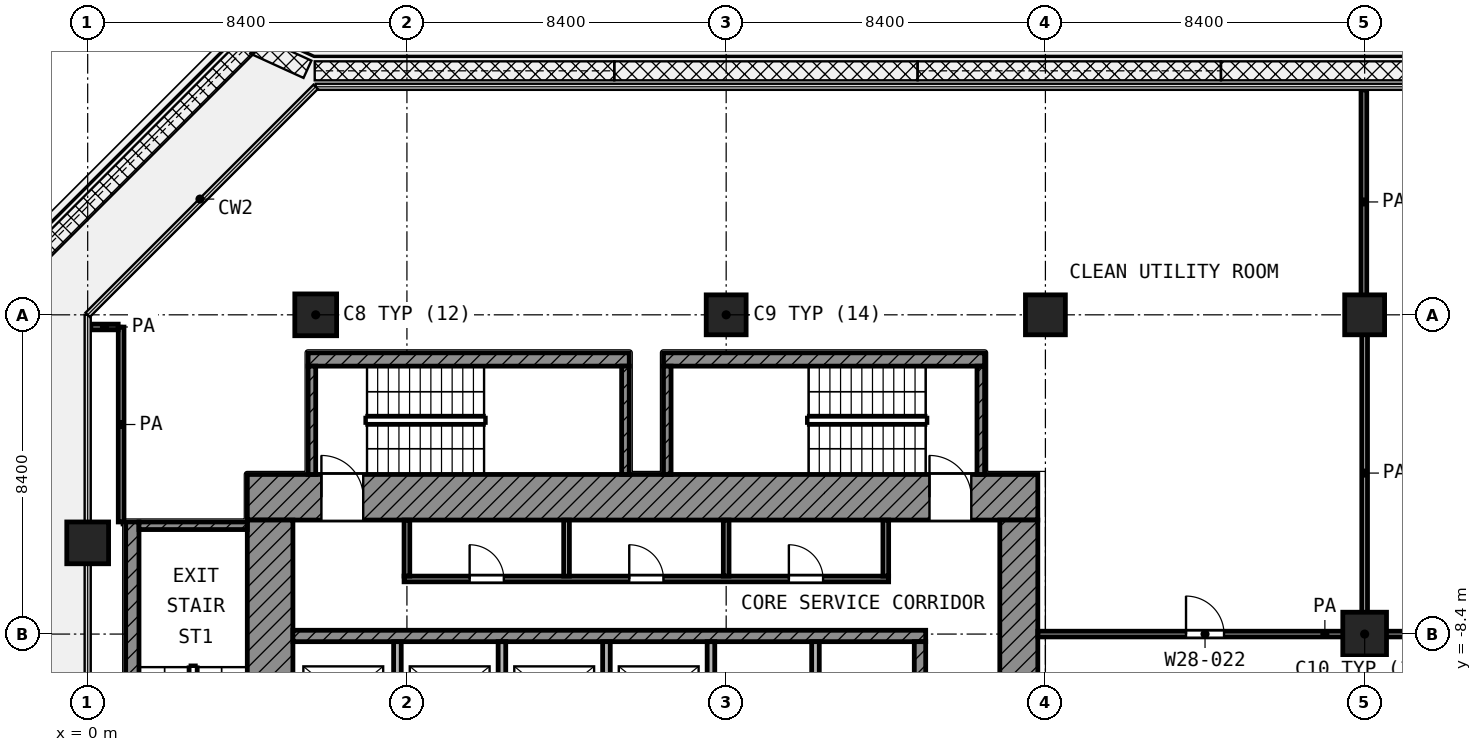
"""IFC4 building model, lengths in metres.
Left out: names, types, materials, properties, quantities, classifications, styles, units other than length and angle.
Written with IfcOpenShell. Run it as: python <this file> out.ifc"""

import sys

from ifc_helpers import new_model, si_unit, direction, frame, frame_2d, origin, origin_2d, place, context, subcontext, project, spatial, rectangle, extrude, element, fill, save


model = new_model("IFC4")
c1 = context("Model", 3, precision=1e-05, world=origin(), true_north=direction((0.0, 1.0)))
c2 = subcontext(c1, "Body", "Model", "MODEL_VIEW")
j1 = project(units=[si_unit("LENGTHUNIT", "METRE"), si_unit("PLANEANGLEUNIT", "RADIAN")], contexts=[c1])
p1 = place(None, origin())
s1 = spatial("IfcSite", under=j1, at=p1, CompositionType="ELEMENT")
p2 = place(p1, origin())
s2 = spatial("IfcBuilding", under=s1, at=p2, CompositionType="ELEMENT")
p3 = place(p2, frame((0.0, 0.0, 145.0)))
s3 = spatial("IfcBuildingStorey", under=s2, at=p3, CompositionType="ELEMENT", Elevation=145.0)
p4 = place(p3, frame((6.0, 0.0, 0.0), z_axis=(0.0, 0.0, 1.0), x_axis=(1.0, 0.0, 0.0)))
e1 = element("IfcColumn", 1, at=p4, inside=s3, PredefinedType="COLUMN", context=c2, shape_type="SweptSolid", body=[
    extrude(rectangle(XDim=1.1, YDim=1.1, at=origin_2d()), origin(), (0.0, 0.0, 1.0), 4.2),
])
for number, where, z_axis, x_axis in (
    (2, (16.8, 0.0, 0.0), (0.0, 0.0, 1.0), (1.0, 0.0, 0.0)),
    (3, (25.2, 0.0, 0.0), (0.0, 0.0, 1.0), (1.0, 0.0, 0.0)),
    (4, (33.6, 0.0, 0.0), (0.0, 0.0, 1.0), (1.0, 0.0, 0.0)),
):
    element("IfcColumn", number, at=place(p3, frame(where, z_axis=z_axis, x_axis=x_axis)), inside=s3, PredefinedType="COLUMN", context=c2, shape_type="SweptSolid", body=[
        extrude(rectangle(XDim=1.05, YDim=1.05, at=origin_2d()), origin(), (0.0, 0.0, 1.0), 4.2),
    ])
p5 = place(p3, frame((0.0, -6.0, 0.0), z_axis=(0.0, 0.0, 1.0), x_axis=(1.0, 0.0, 0.0)))
e5 = element("IfcColumn", 5, at=p5, inside=s3, PredefinedType="COLUMN", context=c2, shape_type="SweptSolid", body=[
    extrude(rectangle(XDim=1.1, YDim=1.1, at=origin_2d()), origin(), (0.0, 0.0, 1.0), 4.2),
])
p6 = place(p3, frame((33.6, -8.4, 0.0), z_axis=(0.0, 0.0, 1.0), x_axis=(1.0, 0.0, 0.0)))
e6 = element("IfcColumn", 6, at=p6, inside=s3, PredefinedType="COLUMN", context=c2, shape_type="SweptSolid", body=[
    extrude(rectangle(XDim=1.15, YDim=1.15, at=origin_2d()), origin(), (0.0, 0.0, 1.0), 4.2),
])
p7 = place(p3, frame((4.2, -4.8, 0.0), z_axis=(0.0, 0.0, 1.0), x_axis=(1.0, 0.0, 0.0)))
e7 = element("IfcWall", 7, at=p7, inside=s3, PredefinedType="SHEAR", context=c2, shape_type="SweptSolid", body=[
    extrude(rectangle(XDim=20.8, YDim=1.2, at=frame_2d((10.4, 0.0))), origin(), (0.0, 0.0, 1.0), 3.6),
])
p8 = place(p7, frame((1.95, 0.0, 0.0)))
e8 = element("IfcOpeningElement", 8, at=p8, cuts=e7, PredefinedType="OPENING", context=c2, shape_type="SweptSolid", body=[
    extrude(rectangle(XDim=1.1, YDim=2.1, at=frame_2d((0.55, 1.05))), frame((0.0, 0.61, 0.0), z_axis=(0.0, -1.0, 0.0), x_axis=(1.0, 0.0, 0.0)), (0.0, 0.0, 1.0), 1.22),
])
p9 = place(p7, frame((17.95, 0.0, 0.0)))
e9 = element("IfcOpeningElement", 9, at=p9, cuts=e7, PredefinedType="OPENING", context=c2, shape_type="SweptSolid", body=[
    extrude(rectangle(XDim=1.1, YDim=2.1, at=frame_2d((0.55, 1.05))), frame((0.0, 0.61, 0.0), z_axis=(0.0, -1.0, 0.0), x_axis=(1.0, 0.0, 0.0)), (0.0, 0.0, 1.0), 1.22),
])
p10 = place(p3, frame((4.8, -25.0, 0.0), z_axis=(0.0, 0.0, 1.0), x_axis=(0.0, 1.0, 0.0)))
e10 = element("IfcWall", 10, at=p10, inside=s3, PredefinedType="SHEAR", context=c2, shape_type="SweptSolid", body=[
    extrude(rectangle(XDim=19.6, YDim=1.2, at=frame_2d((9.8, 0.0))), origin(), (0.0, 0.0, 1.0), 3.6),
])
p11 = place(p10, frame((11.45, 0.0, 0.0)))
e11 = element("IfcOpeningElement", 11, at=p11, cuts=e10, PredefinedType="OPENING", context=c2, shape_type="SweptSolid", body=[
    extrude(rectangle(XDim=1.1, YDim=2.1, at=frame_2d((0.55, 1.05))), frame((0.0, 0.61, 0.0), z_axis=(0.0, -1.0, 0.0), x_axis=(1.0, 0.0, 0.0)), (0.0, 0.0, 1.0), 1.22),
])
p12 = place(p10, frame((2.15, 0.0, 0.0)))
e12 = element("IfcOpeningElement", 12, at=p12, cuts=e10, PredefinedType="OPENING", context=c2, shape_type="SweptSolid", body=[
    extrude(rectangle(XDim=1.1, YDim=2.1, at=frame_2d((0.55, 1.05))), frame((0.0, 0.61, 0.0), z_axis=(0.0, -1.0, 0.0), x_axis=(1.0, 0.0, 0.0)), (0.0, 0.0, 1.0), 1.22),
])
p13 = place(p3, frame((24.5, -24.0, 0.0), z_axis=(0.0, 0.0, 1.0), x_axis=(0.0, 1.0, 0.0)))
e13 = element("IfcWall", 13, at=p13, inside=s3, PredefinedType="SHEAR", context=c2, shape_type="SweptSolid", body=[
    extrude(rectangle(XDim=18.6, YDim=1.0, at=frame_2d((9.3, 0.0))), origin(), (0.0, 0.0, 1.0), 3.6),
])
p14 = place(p13, frame((10.5, 0.0, 0.0)))
e14 = element("IfcOpeningElement", 14, at=p14, cuts=e13, PredefinedType="OPENING", context=c2, shape_type="SweptSolid", body=[
    extrude(rectangle(XDim=1.8, YDim=2.1, at=frame_2d((0.9, 1.05))), frame((0.0, 0.51, 0.0), z_axis=(0.0, -1.0, 0.0), x_axis=(1.0, 0.0, 0.0)), (0.0, 0.0, 1.0), 1.02),
])
p15 = place(p3, frame((5.4, -8.45, 0.0), z_axis=(0.0, 0.0, 1.0), x_axis=(1.0, 0.0, 0.0)))
e15 = element("IfcWall", 15, at=p15, inside=s3, PredefinedType="SHEAR", context=c2, shape_type="SweptSolid", body=[
    extrude(rectangle(XDim=16.65, YDim=0.3, at=frame_2d((8.325, 0.0))), origin(), (0.0, 0.0, 1.0), 3.6),
])
p16 = place(p3, frame((21.9, -10.95, 0.0), z_axis=(0.0, 0.0, 1.0), x_axis=(0.0, 1.0, 0.0)))
e16 = element("IfcWall", 16, at=p16, inside=s3, PredefinedType="SHEAR", context=c2, shape_type="SweptSolid", body=[
    extrude(rectangle(XDim=2.35, YDim=0.3, at=frame_2d((1.175, 0.0))), origin(), (0.0, 0.0, 1.0), 3.6),
])
for number, where, z_axis, x_axis in (
    (17, (8.15, -10.95, 0.0), (0.0, 0.0, 1.0), (0.0, 1.0, 0.0)),
    (18, (10.9, -10.95, 0.0), (0.0, 0.0, 1.0), (0.0, 1.0, 0.0)),
    (19, (13.65, -10.95, 0.0), (0.0, 0.0, 1.0), (0.0, 1.0, 0.0)),
    (20, (16.4, -10.95, 0.0), (0.0, 0.0, 1.0), (0.0, 1.0, 0.0)),
    (21, (19.15, -10.95, 0.0), (0.0, 0.0, 1.0), (0.0, 1.0, 0.0)),
):
    element("IfcWall", number, at=place(p3, frame(where, z_axis=z_axis, x_axis=x_axis)), inside=s3, PredefinedType="PARTITIONING", context=c2, shape_type="SweptSolid", body=[
        extrude(rectangle(XDim=2.35, YDim=0.2, at=frame_2d((1.175, 0.0))), origin(), (0.0, 0.0, 1.0), 3.6),
    ])
p17 = place(p3, frame((8.325, -6.95, 0.0), z_axis=(0.0, 0.0, 1.0), x_axis=(1.0, 0.0, 0.0)))
e22 = element("IfcWall", 22, at=p17, inside=s3, PredefinedType="PARTITIONING", context=c2, shape_type="SweptSolid", body=[
    extrude(rectangle(XDim=12.75, YDim=0.15, at=frame_2d((6.375, 0.0))), origin(), (0.0, 0.0, 1.0), 3.6),
])
p18 = place(p17, frame((1.725, 0.0, 0.0)))
e23 = element("IfcOpeningElement", 23, at=p18, cuts=e22, PredefinedType="OPENING", context=c2, shape_type="SweptSolid", body=[
    extrude(rectangle(XDim=0.9, YDim=2.1, at=frame_2d((0.45, 1.05))), frame((0.0, 0.085, 0.0), z_axis=(0.0, -1.0, 0.0), x_axis=(1.0, 0.0, 0.0)), (0.0, 0.0, 1.0), 0.17),
])
p19 = place(p17, frame((5.925, 0.0, 0.0)))
e24 = element("IfcOpeningElement", 24, at=p19, cuts=e22, PredefinedType="OPENING", context=c2, shape_type="SweptSolid", body=[
    extrude(rectangle(XDim=0.9, YDim=2.1, at=frame_2d((0.45, 1.05))), frame((0.0, 0.085, 0.0), z_axis=(0.0, -1.0, 0.0), x_axis=(1.0, 0.0, 0.0)), (0.0, 0.0, 1.0), 0.17),
])
p20 = place(p17, frame((10.125, 0.0, 0.0)))
e25 = element("IfcOpeningElement", 25, at=p20, cuts=e22, PredefinedType="OPENING", context=c2, shape_type="SweptSolid", body=[
    extrude(rectangle(XDim=0.9, YDim=2.1, at=frame_2d((0.45, 1.05))), frame((0.0, 0.085, 0.0), z_axis=(0.0, -1.0, 0.0), x_axis=(1.0, 0.0, 0.0)), (0.0, 0.0, 1.0), 0.17),
])
for number, where, z_axis, x_axis in (
    (26, (8.4, -6.875, 0.0), (0.0, 0.0, 1.0), (0.0, 1.0, 0.0)),
    (27, (12.6, -6.875, 0.0), (0.0, 0.0, 1.0), (0.0, 1.0, 0.0)),
    (28, (16.8, -6.875, 0.0), (0.0, 0.0, 1.0), (0.0, 1.0, 0.0)),
    (29, (21.0, -6.875, 0.0), (0.0, 0.0, 1.0), (0.0, 1.0, 0.0)),
):
    element("IfcWall", number, at=place(p3, frame(where, z_axis=z_axis, x_axis=x_axis)), inside=s3, PredefinedType="PARTITIONING", context=c2, shape_type="SweptSolid", body=[
        extrude(rectangle(XDim=1.475, YDim=0.15, at=frame_2d((0.738, 0.0))), origin(), (0.0, 0.0, 1.0), 3.6),
    ])
p21 = place(p3, frame((1.175, -13.9, 0.0), z_axis=(0.0, 0.0, 1.0), x_axis=(0.0, 1.0, 0.0)))
e30 = element("IfcWall", 30, at=p21, inside=s3, PredefinedType="SHEAR", context=c2, shape_type="SweptSolid", body=[
    extrude(rectangle(XDim=8.45, YDim=0.35, at=frame_2d((4.225, 0.0))), origin(), (0.0, 0.0, 1.0), 3.6),
])
p22 = place(p3, frame((1.35, -5.55, 0.0), z_axis=(0.0, 0.0, 1.0), x_axis=(1.0, 0.0, 0.0)))
e31 = element("IfcWall", 31, at=p22, inside=s3, PredefinedType="SHEAR", context=c2, shape_type="SweptSolid", body=[
    extrude(rectangle(XDim=2.85, YDim=0.2, at=frame_2d((1.425, 0.0))), origin(), (0.0, 0.0, 1.0), 3.6),
])
p23 = place(p3, frame((5.8, -1.175, 0.0), z_axis=(0.0, 0.0, 1.0), x_axis=(1.0, 0.0, 0.0)))
e32 = element("IfcWall", 32, at=p23, inside=s3, PredefinedType="SHEAR", context=c2, shape_type="SweptSolid", body=[
    extrude(rectangle(XDim=8.45, YDim=0.35, at=frame_2d((4.225, 0.0))), origin(), (0.0, 0.0, 1.0), 3.6),
])
for number, where, z_axis, x_axis in (
    (33, (5.9, -4.2, 0.0), (0.0, 0.0, 1.0), (0.0, 1.0, 0.0)),
    (34, (14.15, -4.2, 0.0), (0.0, 0.0, 1.0), (0.0, 1.0, 0.0)),
):
    element("IfcWall", number, at=place(p3, frame(where, z_axis=z_axis, x_axis=x_axis)), inside=s3, PredefinedType="SHEAR", context=c2, shape_type="SweptSolid", body=[
        extrude(rectangle(XDim=2.85, YDim=0.2, at=frame_2d((1.425, 0.0))), origin(), (0.0, 0.0, 1.0), 3.6),
    ])
p24 = place(p3, frame((15.15, -1.175, 0.0), z_axis=(0.0, 0.0, 1.0), x_axis=(1.0, 0.0, 0.0)))
e35 = element("IfcWall", 35, at=p24, inside=s3, PredefinedType="SHEAR", context=c2, shape_type="SweptSolid", body=[
    extrude(rectangle(XDim=8.45, YDim=0.35, at=frame_2d((4.225, 0.0))), origin(), (0.0, 0.0, 1.0), 3.6),
])
for number, where, z_axis, x_axis in (
    (36, (15.25, -4.2, 0.0), (0.0, 0.0, 1.0), (0.0, 1.0, 0.0)),
    (37, (23.5, -4.2, 0.0), (0.0, 0.0, 1.0), (0.0, 1.0, 0.0)),
):
    element("IfcWall", number, at=place(p3, frame(where, z_axis=z_axis, x_axis=x_axis)), inside=s3, PredefinedType="SHEAR", context=c2, shape_type="SweptSolid", body=[
        extrude(rectangle(XDim=2.85, YDim=0.2, at=frame_2d((1.425, 0.0))), origin(), (0.0, 0.0, 1.0), 3.6),
    ])
p25 = place(p3, frame((25.0, -8.4, 0.0), z_axis=(0.0, 0.0, 1.0), x_axis=(1.0, 0.0, 0.0)))
e38 = element("IfcWall", 38, at=p25, inside=s3, PredefinedType="PARTITIONING", context=c2, shape_type="SweptSolid", body=[
    extrude(rectangle(XDim=15.107, YDim=0.15, at=frame_2d((7.553, 0.0))), origin(), (0.0, 0.0, 1.0), 3.6),
])
p26 = place(p25, frame((3.9, 0.0, 0.0)))
e39 = element("IfcOpeningElement", 39, at=p26, cuts=e38, PredefinedType="OPENING", context=c2, shape_type="SweptSolid", body=[
    extrude(rectangle(XDim=1.0, YDim=2.1, at=frame_2d((0.5, 1.05))), frame((0.0, 0.085, 0.0), z_axis=(0.0, -1.0, 0.0), x_axis=(1.0, 0.0, 0.0)), (0.0, 0.0, 1.0), 0.17),
])
p27 = place(p25, frame((10.1, 0.0, 0.0)))
e40 = element("IfcOpeningElement", 40, at=p27, cuts=e38, PredefinedType="OPENING", context=c2, shape_type="SweptSolid", body=[
    extrude(rectangle(XDim=1.2, YDim=2.1, at=frame_2d((0.6, 1.05))), frame((0.0, 0.085, 0.0), z_axis=(0.0, -1.0, 0.0), x_axis=(1.0, 0.0, 0.0)), (0.0, 0.0, 1.0), 0.17),
])
p28 = place(p3, frame((0.08, -0.32, 0.0), z_axis=(0.0, 0.0, 1.0), x_axis=(1.0, 0.0, 0.0)))
e41 = element("IfcWall", 41, at=p28, inside=s3, PredefinedType="PARTITIONING", context=c2, shape_type="SweptSolid", body=[
    extrude(rectangle(XDim=0.723, YDim=0.15, at=frame_2d((0.361, 0.0))), origin(), (0.0, 0.0, 1.0), 3.6),
])
p29 = place(p3, frame((0.88, -5.45, 0.0), z_axis=(0.0, 0.0, 1.0), x_axis=(0.0, 1.0, 0.0)))
e42 = element("IfcWall", 42, at=p29, inside=s3, PredefinedType="PARTITIONING", context=c2, shape_type="SweptSolid", body=[
    extrude(rectangle(XDim=5.128, YDim=0.15, at=frame_2d((2.564, 0.0))), origin(), (0.0, 0.0, 1.0), 3.6),
])
p30 = place(p3, frame((33.58, 0.02, 0.0), z_axis=(0.0, 0.0, 1.0), x_axis=(0.0, 1.0, 0.0)))
e43 = element("IfcWall", 43, at=p30, inside=s3, PredefinedType="PARTITIONING", context=c2, shape_type="SweptSolid", body=[
    extrude(rectangle(XDim=5.9, YDim=0.15, at=frame_2d((2.95, 0.0))), origin(), (0.0, 0.0, 1.0), 3.6),
])
p31 = place(p3, frame((33.6, -8.325, 0.0), z_axis=(0.0, 0.0, 1.0), x_axis=(0.0, 1.0, 0.0)))
e44 = element("IfcWall", 44, at=p31, inside=s3, PredefinedType="PARTITIONING", context=c2, shape_type="SweptSolid", body=[
    extrude(rectangle(XDim=8.322, YDim=0.15, at=frame_2d((4.161, 0.0))), origin(), (0.0, 0.0, 1.0), 3.6),
])
p32 = place(p8, origin())
e45 = element("IfcDoor", 45, at=p32, inside=s3, OperationType="SINGLE_SWING_LEFT", PredefinedType="DOOR", context=c2, shape_type="SweptSolid", body=[
    extrude(rectangle(XDim=1.1, YDim=2.1, at=frame_2d((0.55, 1.05))), frame((0.0, 0.025, 0.0), z_axis=(0.0, -1.0, 0.0), x_axis=(1.0, 0.0, 0.0)), (0.0, 0.0, 1.0), 0.05),
])
fill(e8, e45)
p33 = place(p9, origin())
e46 = element("IfcDoor", 46, at=p33, inside=s3, OperationType="SINGLE_SWING_LEFT", PredefinedType="DOOR", context=c2, shape_type="SweptSolid", body=[
    extrude(rectangle(XDim=1.1, YDim=2.1, at=frame_2d((0.55, 1.05))), frame((0.0, 0.025, 0.0), z_axis=(0.0, -1.0, 0.0), x_axis=(1.0, 0.0, 0.0)), (0.0, 0.0, 1.0), 0.05),
])
fill(e9, e46)
p34 = place(p18, origin())
e47 = element("IfcDoor", 47, at=p34, inside=s3, OperationType="SINGLE_SWING_LEFT", PredefinedType="DOOR", context=c2, shape_type="SweptSolid", body=[
    extrude(rectangle(XDim=0.9, YDim=2.1, at=frame_2d((0.45, 1.05))), frame((0.0, 0.025, 0.0), z_axis=(0.0, -1.0, 0.0), x_axis=(1.0, 0.0, 0.0)), (0.0, 0.0, 1.0), 0.05),
])
fill(e23, e47)
p35 = place(p19, origin())
e48 = element("IfcDoor", 48, at=p35, inside=s3, OperationType="SINGLE_SWING_LEFT", PredefinedType="DOOR", context=c2, shape_type="SweptSolid", body=[
    extrude(rectangle(XDim=0.9, YDim=2.1, at=frame_2d((0.45, 1.05))), frame((0.0, 0.025, 0.0), z_axis=(0.0, -1.0, 0.0), x_axis=(1.0, 0.0, 0.0)), (0.0, 0.0, 1.0), 0.05),
])
fill(e24, e48)
p36 = place(p20, origin())
e49 = element("IfcDoor", 49, at=p36, inside=s3, OperationType="SINGLE_SWING_LEFT", PredefinedType="DOOR", context=c2, shape_type="SweptSolid", body=[
    extrude(rectangle(XDim=0.9, YDim=2.1, at=frame_2d((0.45, 1.05))), frame((0.0, 0.025, 0.0), z_axis=(0.0, -1.0, 0.0), x_axis=(1.0, 0.0, 0.0)), (0.0, 0.0, 1.0), 0.05),
])
fill(e25, e49)
p37 = place(p26, origin())
e50 = element("IfcDoor", 50, at=p37, inside=s3, OperationType="SINGLE_SWING_LEFT", PredefinedType="DOOR", context=c2, shape_type="SweptSolid", body=[
    extrude(rectangle(XDim=1.0, YDim=2.1, at=frame_2d((0.5, 1.05))), frame((0.0, 0.025, 0.0), z_axis=(0.0, -1.0, 0.0), x_axis=(1.0, 0.0, 0.0)), (0.0, 0.0, 1.0), 0.05),
])
fill(e39, e50)
save(model, sys.argv[1])
